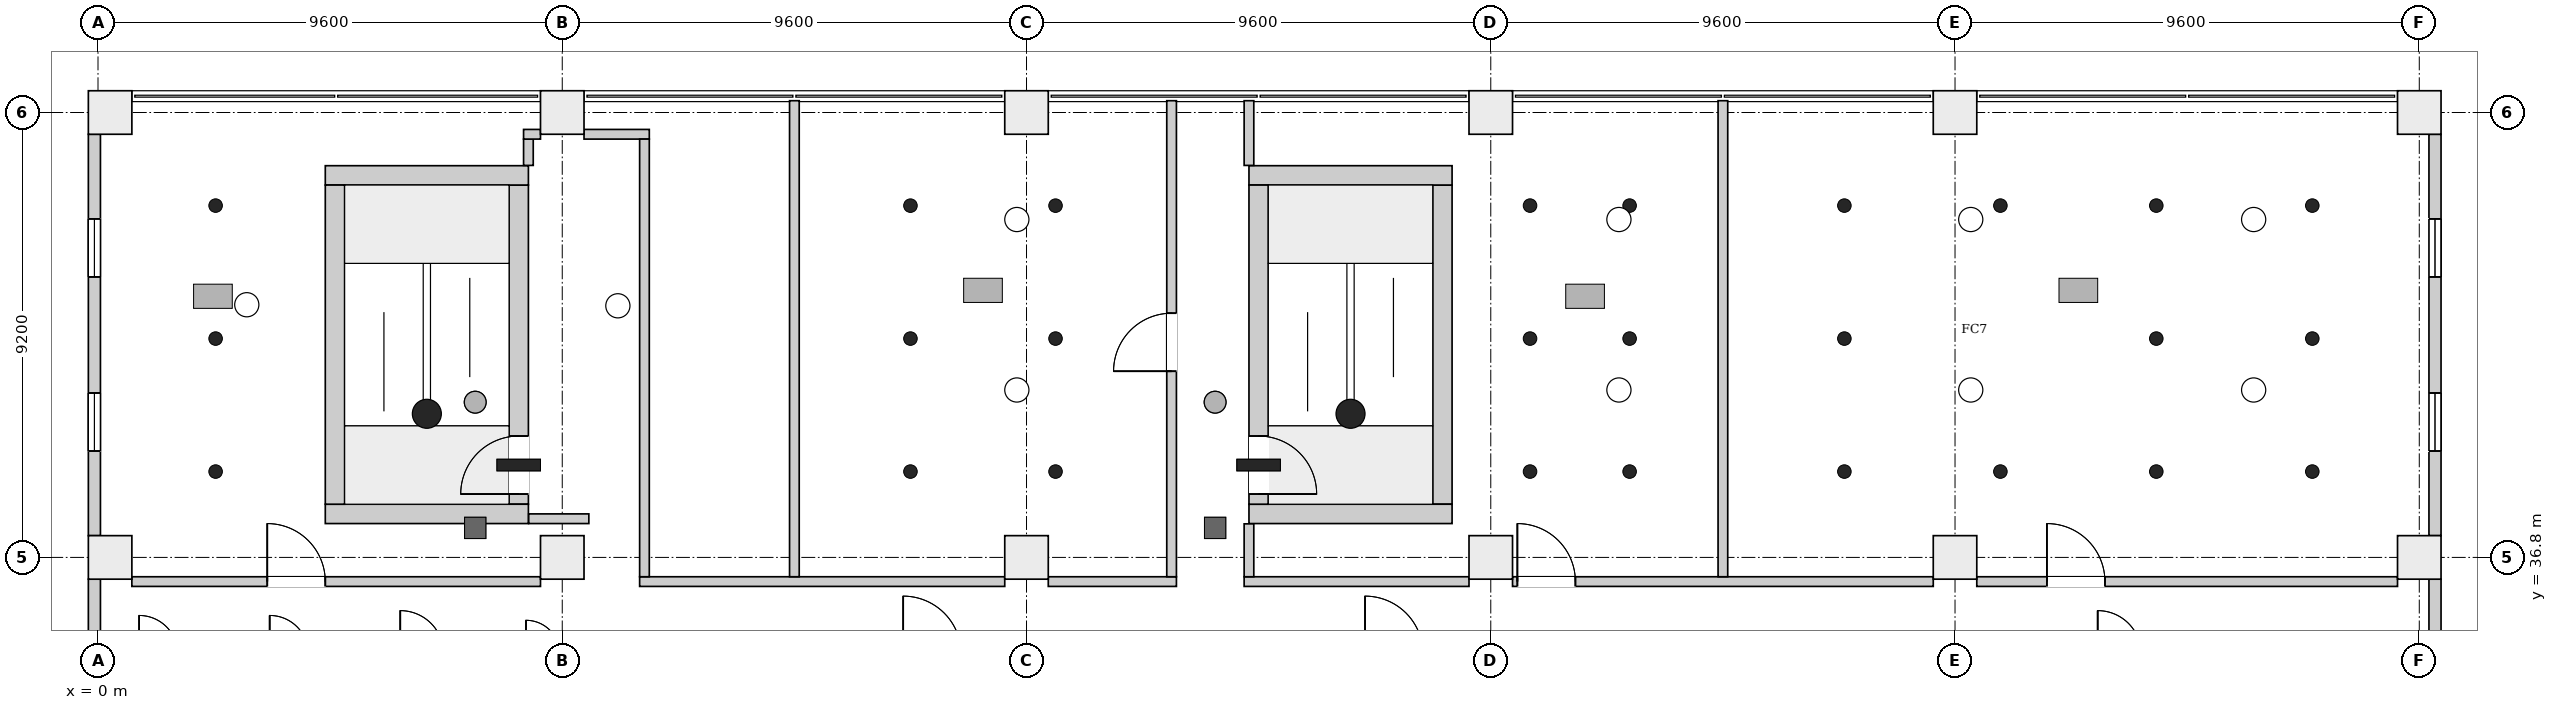
"""IFC4 building model, lengths in metres.
Left out: names, types, materials, properties, quantities, classifications, styles, units other than length and angle.
Written with IfcOpenShell. Run it as: python <this file> out.ifc"""

import sys

from ifc_helpers import new_model, si_unit, direction, frame, frame_2d, origin, origin_2d, place, context, subcontext, project, spatial, rectangle, extrude, element, fill, save


model = new_model("IFC4")
c1 = context("Model", 3, precision=1e-05, world=origin(), true_north=direction((0.0, 1.0)))
c2 = subcontext(c1, "Body", "Model", "MODEL_VIEW")
j1 = project(units=[si_unit("LENGTHUNIT", "METRE"), si_unit("PLANEANGLEUNIT", "RADIAN")], contexts=[c1])
p1 = place(None, origin())
s1 = spatial("IfcSite", under=j1, at=p1, CompositionType="ELEMENT")
p2 = place(p1, origin())
s2 = spatial("IfcBuilding", under=s1, at=p2, CompositionType="ELEMENT")
p3 = place(p2, frame((0.0, 0.0, 40.3)))
s3 = spatial("IfcBuildingStorey", under=s2, at=p3, CompositionType="ELEMENT", Elevation=40.3)
for number, where, z_axis, x_axis in (
    (1, (4.7, 37.7, 0.0), (0.0, 0.0, 1.0), (1.0, 0.0, 0.0)),
    (2, (4.7, 44.7, 0.0), (0.0, 0.0, 1.0), (1.0, 0.0, 0.0)),
):
    element("IfcWall", number, at=place(p3, frame(where, z_axis=z_axis, x_axis=x_axis)), inside=s3, PredefinedType="SHEAR", context=c2, shape_type="SweptSolid", body=[
        extrude(rectangle(XDim=4.2, YDim=0.4, at=frame_2d((2.1, 0.0))), origin(), (0.0, 0.0, 1.0), 4.2),
    ])
p4 = place(p3, frame((4.9, 37.9, 0.0), z_axis=(0.0, 0.0, 1.0), x_axis=(0.0, 1.0, 0.0)))
e3 = element("IfcWall", 3, at=p4, inside=s3, PredefinedType="SHEAR", context=c2, shape_type="SweptSolid", body=[
    extrude(rectangle(XDim=6.6, YDim=0.4, at=frame_2d((3.3, 0.0))), origin(), (0.0, 0.0, 1.0), 4.2),
])
p5 = place(p3, frame((8.7, 37.9, 0.0), z_axis=(0.0, 0.0, 1.0), x_axis=(0.0, 1.0, 0.0)))
e4 = element("IfcWall", 4, at=p5, inside=s3, PredefinedType="SHEAR", context=c2, shape_type="SweptSolid", body=[
    extrude(rectangle(XDim=6.6, YDim=0.4, at=frame_2d((3.3, 0.0))), origin(), (0.0, 0.0, 1.0), 4.2),
])
p6 = place(p5, frame((0.21, 0.0, 0.0)))
e5 = element("IfcOpeningElement", 5, at=p6, cuts=e4, PredefinedType="OPENING", context=c2, shape_type="SweptSolid", body=[
    extrude(rectangle(XDim=1.2, YDim=2.1, at=frame_2d((0.6, 1.05))), frame((0.0, 0.21, 0.0), z_axis=(0.0, -1.0, 0.0), x_axis=(1.0, 0.0, 0.0)), (0.0, 0.0, 1.0), 0.42),
])
for number, where, z_axis, x_axis in (
    (6, (23.8, 37.7, 0.0), (0.0, 0.0, 1.0), (1.0, 0.0, 0.0)),
    (7, (23.8, 44.7, 0.0), (0.0, 0.0, 1.0), (1.0, 0.0, 0.0)),
):
    element("IfcWall", number, at=place(p3, frame(where, z_axis=z_axis, x_axis=x_axis)), inside=s3, PredefinedType="SHEAR", context=c2, shape_type="SweptSolid", body=[
        extrude(rectangle(XDim=4.2, YDim=0.4, at=frame_2d((2.1, 0.0))), origin(), (0.0, 0.0, 1.0), 4.2),
    ])
p7 = place(p3, frame((24.0, 37.9, 0.0), z_axis=(0.0, 0.0, 1.0), x_axis=(0.0, 1.0, 0.0)))
e8 = element("IfcWall", 8, at=p7, inside=s3, PredefinedType="SHEAR", context=c2, shape_type="SweptSolid", body=[
    extrude(rectangle(XDim=6.6, YDim=0.4, at=frame_2d((3.3, 0.0))), origin(), (0.0, 0.0, 1.0), 4.2),
])
p8 = place(p7, frame((0.21, 0.0, 0.0)))
e9 = element("IfcOpeningElement", 9, at=p8, cuts=e8, PredefinedType="OPENING", context=c2, shape_type="SweptSolid", body=[
    extrude(rectangle(XDim=1.2, YDim=2.1, at=frame_2d((0.6, 1.05))), frame((0.0, 0.21, 0.0), z_axis=(0.0, -1.0, 0.0), x_axis=(1.0, 0.0, 0.0)), (0.0, 0.0, 1.0), 0.42),
])
p9 = place(p3, frame((27.8, 37.9, 0.0), z_axis=(0.0, 0.0, 1.0), x_axis=(0.0, 1.0, 0.0)))
e10 = element("IfcWall", 10, at=p9, inside=s3, PredefinedType="SHEAR", context=c2, shape_type="SweptSolid", body=[
    extrude(rectangle(XDim=6.6, YDim=0.4, at=frame_2d((3.3, 0.0))), origin(), (0.0, 0.0, 1.0), 4.2),
])
for number, where, z_axis, x_axis in (
    (11, (0.25, 36.8, 0.0), (0.0, 0.0, 1.0), (1.0, 0.0, 0.0)),
    (12, (9.6, 36.8, 0.0), (0.0, 0.0, 1.0), (1.0, 0.0, 0.0)),
    (13, (19.2, 36.8, 0.0), (0.0, 0.0, 1.0), (1.0, 0.0, 0.0)),
    (14, (28.8, 36.8, 0.0), (0.0, 0.0, 1.0), (1.0, 0.0, 0.0)),
    (15, (38.4, 36.8, 0.0), (0.0, 0.0, 1.0), (1.0, 0.0, 0.0)),
    (16, (48.0, 36.8, 0.0), (0.0, 0.0, 1.0), (1.0, 0.0, 0.0)),
    (17, (0.25, 46.0, 0.0), (0.0, 0.0, 1.0), (1.0, 0.0, 0.0)),
    (18, (9.6, 46.0, 0.0), (0.0, 0.0, 1.0), (1.0, 0.0, 0.0)),
    (19, (19.2, 46.0, 0.0), (0.0, 0.0, 1.0), (1.0, 0.0, 0.0)),
    (20, (28.8, 46.0, 0.0), (0.0, 0.0, 1.0), (1.0, 0.0, 0.0)),
    (21, (38.4, 46.0, 0.0), (0.0, 0.0, 1.0), (1.0, 0.0, 0.0)),
    (22, (48.0, 46.0, 0.0), (0.0, 0.0, 1.0), (1.0, 0.0, 0.0)),
):
    element("IfcColumn", number, at=place(p3, frame(where, z_axis=z_axis, x_axis=x_axis)), inside=s3, PredefinedType="COLUMN", context=c2, shape_type="SweptSolid", body=[
        extrude(rectangle(XDim=0.9, YDim=0.9, at=origin_2d()), origin(), (0.0, 0.0, 1.0), 4.2),
    ])
p10 = place(p3, frame((-0.074, 36.35, 0.0), z_axis=(0.0, 0.0, 1.0), x_axis=(0.0, -1.0, 0.0)))
e23 = element("IfcWall", 23, at=p10, inside=s3, PredefinedType="ELEMENTEDWALL", context=c2, shape_type="SweptSolid", body=[
    extrude(rectangle(XDim=8.3, YDim=0.25, at=frame_2d((4.15, 0.0))), origin(), (0.0, 0.0, 1.0), 3.9),
])
p11 = place(p10, frame((5.35, 0.0, 0.9)))
e24 = element("IfcOpeningElement", 24, at=p11, cuts=e23, PredefinedType="OPENING", context=c2, shape_type="SweptSolid", body=[
    extrude(rectangle(XDim=1.2, YDim=2.6, at=frame_2d((0.6, 1.3))), frame((0.0, 0.135, 0.0), z_axis=(0.0, -1.0, 0.0), x_axis=(1.0, 0.0, 0.0)), (0.0, 0.0, 1.0), 0.27),
])
p12 = place(p10, frame((1.75, 0.0, 0.9)))
e25 = element("IfcOpeningElement", 25, at=p12, cuts=e23, PredefinedType="OPENING", context=c2, shape_type="SweptSolid", body=[
    extrude(rectangle(XDim=1.2, YDim=2.6, at=frame_2d((0.6, 1.3))), frame((0.0, 0.135, 0.0), z_axis=(0.0, -1.0, 0.0), x_axis=(1.0, 0.0, 0.0)), (0.0, 0.0, 1.0), 0.27),
])
p13 = place(p3, frame((-0.074, 45.55, 0.0), z_axis=(0.0, 0.0, 1.0), x_axis=(0.0, -1.0, 0.0)))
e26 = element("IfcWall", 26, at=p13, inside=s3, PredefinedType="ELEMENTEDWALL", context=c2, shape_type="SweptSolid", body=[
    extrude(rectangle(XDim=8.3, YDim=0.25, at=frame_2d((4.15, 0.0))), origin(), (0.0, 0.0, 1.0), 3.9),
])
p14 = place(p13, frame((5.35, 0.0, 0.9)))
e27 = element("IfcOpeningElement", 27, at=p14, cuts=e26, PredefinedType="OPENING", context=c2, shape_type="SweptSolid", body=[
    extrude(rectangle(XDim=1.2, YDim=2.6, at=frame_2d((0.6, 1.3))), frame((0.0, 0.135, 0.0), z_axis=(0.0, -1.0, 0.0), x_axis=(1.0, 0.0, 0.0)), (0.0, 0.0, 1.0), 0.27),
])
p15 = place(p13, frame((1.75, 0.0, 0.9)))
e28 = element("IfcOpeningElement", 28, at=p15, cuts=e26, PredefinedType="OPENING", context=c2, shape_type="SweptSolid", body=[
    extrude(rectangle(XDim=1.2, YDim=2.6, at=frame_2d((0.6, 1.3))), frame((0.0, 0.135, 0.0), z_axis=(0.0, -1.0, 0.0), x_axis=(1.0, 0.0, 0.0)), (0.0, 0.0, 1.0), 0.27),
])
p16 = place(p3, frame((48.325, 28.05, 0.0), z_axis=(0.0, 0.0, 1.0), x_axis=(0.0, 1.0, 0.0)))
e29 = element("IfcWall", 29, at=p16, inside=s3, PredefinedType="ELEMENTEDWALL", context=c2, shape_type="SweptSolid", body=[
    extrude(rectangle(XDim=8.3, YDim=0.25, at=frame_2d((4.15, 0.0))), origin(), (0.0, 0.0, 1.0), 3.9),
])
p17 = place(p16, frame((1.75, 0.0, 0.9)))
e30 = element("IfcOpeningElement", 30, at=p17, cuts=e29, PredefinedType="OPENING", context=c2, shape_type="SweptSolid", body=[
    extrude(rectangle(XDim=1.2, YDim=2.6, at=frame_2d((0.6, 1.3))), frame((0.0, 0.135, 0.0), z_axis=(0.0, -1.0, 0.0), x_axis=(1.0, 0.0, 0.0)), (0.0, 0.0, 1.0), 0.27),
])
p18 = place(p16, frame((5.35, 0.0, 0.9)))
e31 = element("IfcOpeningElement", 31, at=p18, cuts=e29, PredefinedType="OPENING", context=c2, shape_type="SweptSolid", body=[
    extrude(rectangle(XDim=1.2, YDim=2.6, at=frame_2d((0.6, 1.3))), frame((0.0, 0.135, 0.0), z_axis=(0.0, -1.0, 0.0), x_axis=(1.0, 0.0, 0.0)), (0.0, 0.0, 1.0), 0.27),
])
p19 = place(p3, frame((48.325, 37.25, 0.0), z_axis=(0.0, 0.0, 1.0), x_axis=(0.0, 1.0, 0.0)))
e32 = element("IfcWall", 32, at=p19, inside=s3, PredefinedType="ELEMENTEDWALL", context=c2, shape_type="SweptSolid", body=[
    extrude(rectangle(XDim=8.3, YDim=0.25, at=frame_2d((4.15, 0.0))), origin(), (0.0, 0.0, 1.0), 3.9),
])
p20 = place(p19, frame((1.75, 0.0, 0.9)))
e33 = element("IfcOpeningElement", 33, at=p20, cuts=e32, PredefinedType="OPENING", context=c2, shape_type="SweptSolid", body=[
    extrude(rectangle(XDim=1.2, YDim=2.6, at=frame_2d((0.6, 1.3))), frame((0.0, 0.135, 0.0), z_axis=(0.0, -1.0, 0.0), x_axis=(1.0, 0.0, 0.0)), (0.0, 0.0, 1.0), 0.27),
])
p21 = place(p19, frame((5.35, 0.0, 0.9)))
e34 = element("IfcOpeningElement", 34, at=p21, cuts=e32, PredefinedType="OPENING", context=c2, shape_type="SweptSolid", body=[
    extrude(rectangle(XDim=1.2, YDim=2.6, at=frame_2d((0.6, 1.3))), frame((0.0, 0.135, 0.0), z_axis=(0.0, -1.0, 0.0), x_axis=(1.0, 0.0, 0.0)), (0.0, 0.0, 1.0), 0.27),
])
p22 = place(p3, frame((0.7, 36.3, 0.0), z_axis=(0.0, 0.0, 1.0), x_axis=(1.0, 0.0, 0.0)))
e35 = element("IfcWall", 35, at=p22, inside=s3, PredefinedType="PARTITIONING", context=c2, shape_type="SweptSolid", body=[
    extrude(rectangle(XDim=8.45, YDim=0.2, at=frame_2d((4.225, 0.0))), origin(), (0.0, 0.0, 1.0), 3.9),
])
p23 = place(p22, frame((2.8, 0.0, 0.0)))
e36 = element("IfcOpeningElement", 36, at=p23, cuts=e35, PredefinedType="OPENING", context=c2, shape_type="SweptSolid", body=[
    extrude(rectangle(XDim=1.2, YDim=2.1, at=frame_2d((0.6, 1.05))), frame((0.0, 0.11, 0.0), z_axis=(0.0, -1.0, 0.0), x_axis=(1.0, 0.0, 0.0)), (0.0, 0.0, 1.0), 0.22),
])
p24 = place(p3, frame((8.9, 44.906, 0.0), z_axis=(0.0, 0.0, 1.0), x_axis=(0.0, 1.0, 0.0)))
e37 = element("IfcWall", 37, at=p24, inside=s3, PredefinedType="PARTITIONING", context=c2, shape_type="SweptSolid", body=[
    extrude(rectangle(XDim=0.544, YDim=0.2, at=frame_2d((0.272, 0.0))), origin(), (0.0, 0.0, 1.0), 3.9),
])
p25 = place(p3, frame((8.8, 45.55, 0.0), z_axis=(0.0, 0.0, 1.0), x_axis=(1.0, 0.0, 0.0)))
e38 = element("IfcWall", 38, at=p25, inside=s3, PredefinedType="PARTITIONING", context=c2, shape_type="SweptSolid", body=[
    extrude(rectangle(XDim=0.35, YDim=0.2, at=frame_2d((0.175, 0.0))), origin(), (0.0, 0.0, 1.0), 3.9),
])
p26 = place(p3, frame((8.906, 37.6, 0.0), z_axis=(0.0, 0.0, 1.0), x_axis=(1.0, 0.0, 0.0)))
e39 = element("IfcWall", 39, at=p26, inside=s3, PredefinedType="PARTITIONING", context=c2, shape_type="SweptSolid", body=[
    extrude(rectangle(XDim=1.244, YDim=0.2, at=frame_2d((0.622, 0.0))), origin(), (0.0, 0.0, 1.0), 3.9),
])
p27 = place(p3, frame((10.05, 45.55, 0.0), z_axis=(0.0, 0.0, 1.0), x_axis=(1.0, 0.0, 0.0)))
e40 = element("IfcWall", 40, at=p27, inside=s3, PredefinedType="PARTITIONING", context=c2, shape_type="SweptSolid", body=[
    extrude(rectangle(XDim=1.35, YDim=0.2, at=frame_2d((0.675, 0.0))), origin(), (0.0, 0.0, 1.0), 3.9),
])
p28 = place(p3, frame((11.2, 36.3, 0.0), z_axis=(0.0, 0.0, 1.0), x_axis=(1.0, 0.0, 0.0)))
e41 = element("IfcWall", 41, at=p28, inside=s3, PredefinedType="PARTITIONING", context=c2, shape_type="SweptSolid", body=[
    extrude(rectangle(XDim=7.55, YDim=0.2, at=frame_2d((3.775, 0.0))), origin(), (0.0, 0.0, 1.0), 3.9),
])
p29 = place(p3, frame((11.3, 36.4, 0.0), z_axis=(0.0, 0.0, 1.0), x_axis=(0.0, 1.0, 0.0)))
e42 = element("IfcWall", 42, at=p29, inside=s3, PredefinedType="PARTITIONING", context=c2, shape_type="SweptSolid", body=[
    extrude(rectangle(XDim=9.05, YDim=0.2, at=frame_2d((4.525, 0.0))), origin(), (0.0, 0.0, 1.0), 3.9),
])
p30 = place(p3, frame((14.4, 36.4, 0.0), z_axis=(0.0, 0.0, 1.0), x_axis=(0.0, 1.0, 0.0)))
e43 = element("IfcWall", 43, at=p30, inside=s3, PredefinedType="PARTITIONING", context=c2, shape_type="SweptSolid", body=[
    extrude(rectangle(XDim=9.844, YDim=0.2, at=frame_2d((4.922, 0.0))), origin(), (0.0, 0.0, 1.0), 3.9),
])
p31 = place(p3, frame((19.65, 36.3, 0.0), z_axis=(0.0, 0.0, 1.0), x_axis=(1.0, 0.0, 0.0)))
e44 = element("IfcWall", 44, at=p31, inside=s3, PredefinedType="PARTITIONING", context=c2, shape_type="SweptSolid", body=[
    extrude(rectangle(XDim=2.65, YDim=0.2, at=frame_2d((1.325, 0.0))), origin(), (0.0, 0.0, 1.0), 3.9),
])
p32 = place(p3, frame((22.2, 36.4, 0.0), z_axis=(0.0, 0.0, 1.0), x_axis=(0.0, 1.0, 0.0)))
e45 = element("IfcWall", 45, at=p32, inside=s3, PredefinedType="PARTITIONING", context=c2, shape_type="SweptSolid", body=[
    extrude(rectangle(XDim=9.844, YDim=0.2, at=frame_2d((4.922, 0.0))), origin(), (0.0, 0.0, 1.0), 3.9),
])
p33 = place(p32, frame((4.25, 0.0, 0.0)))
e46 = element("IfcOpeningElement", 46, at=p33, cuts=e45, PredefinedType="OPENING", context=c2, shape_type="SweptSolid", body=[
    extrude(rectangle(XDim=1.2, YDim=2.1, at=frame_2d((0.6, 1.05))), frame((0.0, 0.11, 0.0), z_axis=(0.0, -1.0, 0.0), x_axis=(1.0, 0.0, 0.0)), (0.0, 0.0, 1.0), 0.22),
])
p34 = place(p3, frame((23.7, 36.3, 0.0), z_axis=(0.0, 0.0, 1.0), x_axis=(1.0, 0.0, 0.0)))
e47 = element("IfcWall", 47, at=p34, inside=s3, PredefinedType="PARTITIONING", context=c2, shape_type="SweptSolid", body=[
    extrude(rectangle(XDim=4.65, YDim=0.2, at=frame_2d((2.325, 0.0))), origin(), (0.0, 0.0, 1.0), 3.9),
])
p35 = place(p3, frame((23.8, 36.4, 0.0), z_axis=(0.0, 0.0, 1.0), x_axis=(0.0, 1.0, 0.0)))
e48 = element("IfcWall", 48, at=p35, inside=s3, PredefinedType="PARTITIONING", context=c2, shape_type="SweptSolid", body=[
    extrude(rectangle(XDim=1.094, YDim=0.2, at=frame_2d((0.547, 0.0))), origin(), (0.0, 0.0, 1.0), 3.9),
])
p36 = place(p3, frame((23.8, 44.906, 0.0), z_axis=(0.0, 0.0, 1.0), x_axis=(0.0, 1.0, 0.0)))
e49 = element("IfcWall", 49, at=p36, inside=s3, PredefinedType="PARTITIONING", context=c2, shape_type="SweptSolid", body=[
    extrude(rectangle(XDim=1.338, YDim=0.2, at=frame_2d((0.669, 0.0))), origin(), (0.0, 0.0, 1.0), 3.9),
])
p37 = place(p3, frame((29.25, 36.3, 0.0), z_axis=(0.0, 0.0, 1.0), x_axis=(1.0, 0.0, 0.0)))
e50 = element("IfcWall", 50, at=p37, inside=s3, PredefinedType="PARTITIONING", context=c2, shape_type="SweptSolid", body=[
    extrude(rectangle(XDim=8.7, YDim=0.2, at=frame_2d((4.35, 0.0))), origin(), (0.0, 0.0, 1.0), 3.9),
])
p38 = place(p37, frame((0.1, 0.0, 0.0)))
e51 = element("IfcOpeningElement", 51, at=p38, cuts=e50, PredefinedType="OPENING", context=c2, shape_type="SweptSolid", body=[
    extrude(rectangle(XDim=1.2, YDim=2.1, at=frame_2d((0.6, 1.05))), frame((0.0, 0.11, 0.0), z_axis=(0.0, -1.0, 0.0), x_axis=(1.0, 0.0, 0.0)), (0.0, 0.0, 1.0), 0.22),
])
p39 = place(p3, frame((33.6, 36.4, 0.0), z_axis=(0.0, 0.0, 1.0), x_axis=(0.0, 1.0, 0.0)))
e52 = element("IfcWall", 52, at=p39, inside=s3, PredefinedType="PARTITIONING", context=c2, shape_type="SweptSolid", body=[
    extrude(rectangle(XDim=9.844, YDim=0.2, at=frame_2d((4.922, 0.0))), origin(), (0.0, 0.0, 1.0), 3.9),
])
p40 = place(p3, frame((38.85, 36.3, 0.0), z_axis=(0.0, 0.0, 1.0), x_axis=(1.0, 0.0, 0.0)))
e53 = element("IfcWall", 53, at=p40, inside=s3, PredefinedType="PARTITIONING", context=c2, shape_type="SweptSolid", body=[
    extrude(rectangle(XDim=8.7, YDim=0.2, at=frame_2d((4.35, 0.0))), origin(), (0.0, 0.0, 1.0), 3.9),
])
p41 = place(p40, frame((1.45, 0.0, 0.0)))
e54 = element("IfcOpeningElement", 54, at=p41, cuts=e53, PredefinedType="OPENING", context=c2, shape_type="SweptSolid", body=[
    extrude(rectangle(XDim=1.2, YDim=2.1, at=frame_2d((0.6, 1.05))), frame((0.0, 0.11, 0.0), z_axis=(0.0, -1.0, 0.0), x_axis=(1.0, 0.0, 0.0)), (0.0, 0.0, 1.0), 0.22),
])
p42 = place(p14, origin())
e55 = element("IfcWindow", 55, at=p42, inside=s3, PartitioningType="SINGLE_PANEL", PredefinedType="WINDOW", context=c2, shape_type="SweptSolid", body=[
    extrude(rectangle(XDim=1.2, YDim=2.6, at=frame_2d((0.6, 1.3))), frame((0.0, 0.03, 0.0), z_axis=(0.0, -1.0, 0.0), x_axis=(1.0, 0.0, 0.0)), (0.0, 0.0, 1.0), 0.06),
])
fill(e27, e55)
p43 = place(p15, origin())
e56 = element("IfcWindow", 56, at=p43, inside=s3, PartitioningType="SINGLE_PANEL", PredefinedType="WINDOW", context=c2, shape_type="SweptSolid", body=[
    extrude(rectangle(XDim=1.2, YDim=2.6, at=frame_2d((0.6, 1.3))), frame((0.0, 0.03, 0.0), z_axis=(0.0, -1.0, 0.0), x_axis=(1.0, 0.0, 0.0)), (0.0, 0.0, 1.0), 0.06),
])
fill(e28, e56)
p44 = place(p20, origin())
e57 = element("IfcWindow", 57, at=p44, inside=s3, PartitioningType="SINGLE_PANEL", PredefinedType="WINDOW", context=c2, shape_type="SweptSolid", body=[
    extrude(rectangle(XDim=1.2, YDim=2.6, at=frame_2d((0.6, 1.3))), frame((0.0, 0.03, 0.0), z_axis=(0.0, -1.0, 0.0), x_axis=(1.0, 0.0, 0.0)), (0.0, 0.0, 1.0), 0.06),
])
fill(e33, e57)
p45 = place(p21, origin())
e58 = element("IfcWindow", 58, at=p45, inside=s3, PartitioningType="SINGLE_PANEL", PredefinedType="WINDOW", context=c2, shape_type="SweptSolid", body=[
    extrude(rectangle(XDim=1.2, YDim=2.6, at=frame_2d((0.6, 1.3))), frame((0.0, 0.03, 0.0), z_axis=(0.0, -1.0, 0.0), x_axis=(1.0, 0.0, 0.0)), (0.0, 0.0, 1.0), 0.06),
])
fill(e34, e58)
p46 = place(p6, origin())
e59 = element("IfcDoor", 59, at=p46, inside=s3, OperationType="SINGLE_SWING_RIGHT", PredefinedType="DOOR", context=c2, shape_type="SweptSolid", body=[
    extrude(rectangle(XDim=1.2, YDim=2.1, at=frame_2d((0.6, 1.05))), frame((0.0, 0.025, 0.0), z_axis=(0.0, -1.0, 0.0), x_axis=(1.0, 0.0, 0.0)), (0.0, 0.0, 1.0), 0.05),
])
fill(e5, e59)
p47 = place(p8, origin())
e60 = element("IfcDoor", 60, at=p47, inside=s3, OperationType="SINGLE_SWING_LEFT", PredefinedType="DOOR", context=c2, shape_type="SweptSolid", body=[
    extrude(rectangle(XDim=1.2, YDim=2.1, at=frame_2d((0.6, 1.05))), frame((0.0, 0.025, 0.0), z_axis=(0.0, -1.0, 0.0), x_axis=(1.0, 0.0, 0.0)), (0.0, 0.0, 1.0), 0.05),
])
fill(e9, e60)
p48 = place(p23, origin())
e61 = element("IfcDoor", 61, at=p48, inside=s3, OperationType="SINGLE_SWING_RIGHT", PredefinedType="DOOR", context=c2, shape_type="SweptSolid", body=[
    extrude(rectangle(XDim=1.2, YDim=2.1, at=frame_2d((0.6, 1.05))), frame((0.0, 0.025, 0.0), z_axis=(0.0, -1.0, 0.0), x_axis=(1.0, 0.0, 0.0)), (0.0, 0.0, 1.0), 0.05),
])
fill(e36, e61)
p49 = place(p33, origin())
e62 = element("IfcDoor", 62, at=p49, inside=s3, OperationType="SINGLE_SWING_RIGHT", PredefinedType="DOOR", context=c2, shape_type="SweptSolid", body=[
    extrude(rectangle(XDim=1.2, YDim=2.1, at=frame_2d((0.6, 1.05))), frame((0.0, 0.025, 0.0), z_axis=(0.0, -1.0, 0.0), x_axis=(1.0, 0.0, 0.0)), (0.0, 0.0, 1.0), 0.05),
])
fill(e46, e62)
p50 = place(p38, origin())
e63 = element("IfcDoor", 63, at=p50, inside=s3, OperationType="SINGLE_SWING_LEFT", PredefinedType="DOOR", context=c2, shape_type="SweptSolid", body=[
    extrude(rectangle(XDim=1.2, YDim=2.1, at=frame_2d((0.6, 1.05))), frame((0.0, 0.025, 0.0), z_axis=(0.0, -1.0, 0.0), x_axis=(1.0, 0.0, 0.0)), (0.0, 0.0, 1.0), 0.05),
])
fill(e51, e63)
p51 = place(p41, origin())
e64 = element("IfcDoor", 64, at=p51, inside=s3, OperationType="SINGLE_SWING_RIGHT", PredefinedType="DOOR", context=c2, shape_type="SweptSolid", body=[
    extrude(rectangle(XDim=1.2, YDim=2.1, at=frame_2d((0.6, 1.05))), frame((0.0, 0.025, 0.0), z_axis=(0.0, -1.0, 0.0), x_axis=(1.0, 0.0, 0.0)), (0.0, 0.0, 1.0), 0.05),
])
fill(e54, e64)
save(model, sys.argv[1])
